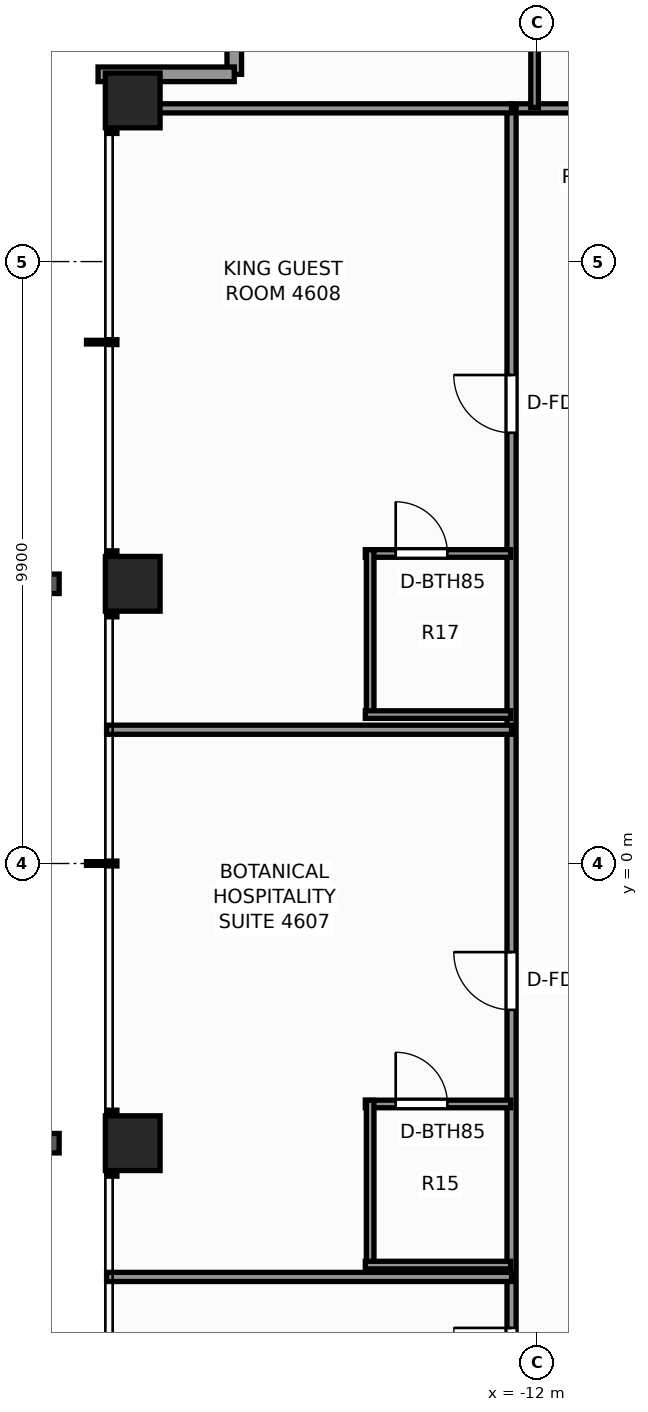
"""IFC4 building model, lengths in metres.
Left out: names, types, materials, properties, quantities, classifications, styles, units other than length and angle.
Written with IfcOpenShell. Run it as: python <this file> out.ifc"""

import sys

from ifc_helpers import new_model, si_unit, direction, frame, frame_2d, origin, origin_2d, place, context, subcontext, project, spatial, rectangle, extrude, element, fill, save


model = new_model("IFC4")
c1 = context("Model", 3, precision=1e-05, world=origin(), true_north=direction((0.0, 1.0)))
c2 = subcontext(c1, "Body", "Model", "MODEL_VIEW")
j1 = project(units=[si_unit("LENGTHUNIT", "METRE"), si_unit("PLANEANGLEUNIT", "RADIAN")], contexts=[c1])
p1 = place(None, origin())
s1 = spatial("IfcSite", under=j1, at=p1, CompositionType="ELEMENT")
p2 = place(p1, origin())
s2 = spatial("IfcBuilding", under=s1, at=p2, CompositionType="ELEMENT")
p3 = place(p2, frame((0.0, 0.0, 160.2)))
s3 = spatial("IfcBuildingStorey", under=s2, at=p3, CompositionType="ELEMENT", Elevation=160.2)
for number, where, z_axis, x_axis in (
    (1, (-18.65, -4.6, 0.0), (0.0, 0.0, 1.0), (1.0, 0.0, 0.0)),
    (2, (-18.65, 4.6, 0.0), (0.0, 0.0, 1.0), (1.0, 0.0, 0.0)),
    (3, (-18.65, 12.55, 0.0), (0.0, 0.0, 1.0), (1.0, 0.0, 0.0)),
):
    element("IfcColumn", number, at=place(p3, frame(where, z_axis=z_axis, x_axis=x_axis)), inside=s3, PredefinedType="COLUMN", context=c2, shape_type="SweptSolid", body=[
        extrude(rectangle(XDim=0.9, YDim=0.9, at=origin_2d()), origin(), (0.0, 0.0, 1.0), 3.3),
    ])
p4 = place(p3, frame((-16.98, 12.98, 0.0), z_axis=(0.0, 0.0, 1.0), x_axis=(0.0, 1.0, 0.0)))
e4 = element("IfcWall", 4, at=p4, inside=s3, PredefinedType="STANDARD", context=c2, shape_type="SweptSolid", body=[
    extrude(rectangle(XDim=2.24, YDim=0.24, at=frame_2d((1.12, 0.0))), origin(), (0.0, 0.0, 1.0), 2.483),
])
p5 = place(p4, frame((0.45, 0.0, 0.65)))
e5 = element("IfcOpeningElement", 5, at=p5, cuts=e4, PredefinedType="OPENING", context=c2, shape_type="SweptSolid", body=[
    extrude(rectangle(XDim=1.1, YDim=1.45, at=frame_2d((0.55, 0.725))), frame((0.0, 0.13, 0.0), z_axis=(0.0, -1.0, 0.0), x_axis=(1.0, 0.0, 0.0)), (0.0, 0.0, 1.0), 0.26),
])
p6 = place(p3, frame((-19.22, 12.98, 0.0), z_axis=(0.0, 0.0, 1.0), x_axis=(1.0, 0.0, 0.0)))
e6 = element("IfcWall", 6, at=p6, inside=s3, PredefinedType="STANDARD", context=c2, shape_type="SweptSolid", body=[
    extrude(rectangle(XDim=2.24, YDim=0.24, at=frame_2d((1.12, 0.0))), origin(), (0.0, 0.0, 1.0), 2.483),
])
p7 = place(p3, frame((-12.42, 12.42, 0.0), z_axis=(0.0, 0.0, 1.0), x_axis=(1.0, 0.0, 0.0)))
e7 = element("IfcWall", 7, at=p7, inside=s3, PredefinedType="PARTITIONING", context=c2, shape_type="SweptSolid", body=[
    extrude(rectangle(XDim=24.84, YDim=0.15, at=frame_2d((12.42, 0.0))), origin(), (0.0, 0.0, 1.0), 2.389),
])
p8 = place(p7, frame((3.831, 0.0, 0.0)))
e8 = element("IfcOpeningElement", 8, at=p8, cuts=e7, PredefinedType="OPENING", context=c2, shape_type="SweptSolid", body=[
    extrude(rectangle(XDim=0.95, YDim=2.06, at=frame_2d((0.475, 1.03))), frame((0.0, 0.085, 0.0), z_axis=(0.0, -1.0, 0.0), x_axis=(1.0, 0.0, 0.0)), (0.0, 0.0, 1.0), 0.17),
])
p9 = place(p7, frame((5.877, 0.0, 0.0)))
e9 = element("IfcOpeningElement", 9, at=p9, cuts=e7, PredefinedType="OPENING", context=c2, shape_type="SweptSolid", body=[
    extrude(rectangle(XDim=0.9, YDim=2.06, at=frame_2d((0.45, 1.03))), frame((0.0, 0.085, 0.0), z_axis=(0.0, -1.0, 0.0), x_axis=(1.0, 0.0, 0.0)), (0.0, 0.0, 1.0), 0.17),
])
p10 = place(p7, frame((13.146, 0.0, 0.0)))
e10 = element("IfcOpeningElement", 10, at=p10, cuts=e7, PredefinedType="OPENING", context=c2, shape_type="SweptSolid", body=[
    extrude(rectangle(XDim=0.95, YDim=2.06, at=frame_2d((0.475, 1.03))), frame((0.0, 0.085, 0.0), z_axis=(0.0, -1.0, 0.0), x_axis=(1.0, 0.0, 0.0)), (0.0, 0.0, 1.0), 0.17),
])
p11 = place(p7, frame((18.653, 0.0, 0.0)))
e11 = element("IfcOpeningElement", 11, at=p11, cuts=e7, PredefinedType="OPENING", context=c2, shape_type="SweptSolid", body=[
    extrude(rectangle(XDim=0.95, YDim=2.06, at=frame_2d((0.475, 1.03))), frame((0.0, 0.085, 0.0), z_axis=(0.0, -1.0, 0.0), x_axis=(1.0, 0.0, 0.0)), (0.0, 0.0, 1.0), 0.17),
])
p12 = place(p7, frame((20.916, 0.0, 0.0)))
e12 = element("IfcOpeningElement", 12, at=p12, cuts=e7, PredefinedType="OPENING", context=c2, shape_type="SweptSolid", body=[
    extrude(rectangle(XDim=0.9, YDim=2.06, at=frame_2d((0.45, 1.03))), frame((0.0, 0.085, 0.0), z_axis=(0.0, -1.0, 0.0), x_axis=(1.0, 0.0, 0.0)), (0.0, 0.0, 1.0), 0.17),
])
p13 = place(p3, frame((-12.42, -12.42, 0.0), z_axis=(0.0, 0.0, 1.0), x_axis=(0.0, 1.0, 0.0)))
e13 = element("IfcWall", 13, at=p13, inside=s3, PredefinedType="PARTITIONING", context=c2, shape_type="SweptSolid", body=[
    extrude(rectangle(XDim=24.84, YDim=0.15, at=frame_2d((12.42, 0.0))), origin(), (0.0, 0.0, 1.0), 2.389),
])
p14 = place(p13, frame((3.831, 0.0, 0.0)))
e14 = element("IfcOpeningElement", 14, at=p14, cuts=e13, PredefinedType="OPENING", context=c2, shape_type="SweptSolid", body=[
    extrude(rectangle(XDim=0.95, YDim=2.06, at=frame_2d((0.475, 1.03))), frame((0.0, 0.085, 0.0), z_axis=(0.0, -1.0, 0.0), x_axis=(1.0, 0.0, 0.0)), (0.0, 0.0, 1.0), 0.17),
])
p15 = place(p13, frame((10.012, 0.0, 0.0)))
e15 = element("IfcOpeningElement", 15, at=p15, cuts=e13, PredefinedType="OPENING", context=c2, shape_type="SweptSolid", body=[
    extrude(rectangle(XDim=0.95, YDim=2.06, at=frame_2d((0.475, 1.03))), frame((0.0, 0.085, 0.0), z_axis=(0.0, -1.0, 0.0), x_axis=(1.0, 0.0, 0.0)), (0.0, 0.0, 1.0), 0.17),
])
p16 = place(p13, frame((19.504, 0.0, 0.0)))
e16 = element("IfcOpeningElement", 16, at=p16, cuts=e13, PredefinedType="OPENING", context=c2, shape_type="SweptSolid", body=[
    extrude(rectangle(XDim=0.95, YDim=2.06, at=frame_2d((0.475, 1.03))), frame((0.0, 0.085, 0.0), z_axis=(0.0, -1.0, 0.0), x_axis=(1.0, 0.0, 0.0)), (0.0, 0.0, 1.0), 0.17),
])
p17 = place(p3, frame((-19.08, 12.42, 0.0), z_axis=(0.0, 0.0, 1.0), x_axis=(1.0, 0.0, 0.0)))
e17 = element("IfcWall", 17, at=p17, inside=s3, PredefinedType="PARTITIONING", context=c2, shape_type="SweptSolid", body=[
    extrude(rectangle(XDim=6.66, YDim=0.15, at=frame_2d((3.33, 0.0))), origin(), (0.0, 0.0, 1.0), 2.389),
])
for number, where, z_axis, x_axis in (
    (18, (-19.08, -6.8, 0.0), (0.0, 0.0, 1.0), (1.0, 0.0, 0.0)),
    (19, (-19.08, 2.2, 0.0), (0.0, 0.0, 1.0), (1.0, 0.0, 0.0)),
):
    element("IfcWall", number, at=place(p3, frame(where, z_axis=z_axis, x_axis=x_axis)), inside=s3, PredefinedType="PARTITIONING", context=c2, shape_type="SweptSolid", body=[
        extrude(rectangle(XDim=6.66, YDim=0.15, at=frame_2d((3.33, 0.0))), origin(), (0.0, 0.0, 1.0), 2.473),
    ])
p18 = place(p3, frame((-14.825, -3.955, 0.0), z_axis=(0.0, 0.0, 1.0), x_axis=(1.0, 0.0, 0.0)))
e20 = element("IfcWall", 20, at=p18, inside=s3, PredefinedType="PARTITIONING", context=c2, shape_type="SweptSolid", body=[
    extrude(rectangle(XDim=2.39, YDim=0.125, at=frame_2d((1.195, 0.0))), origin(), (0.0, 0.0, 1.0), 3.1),
])
p19 = place(p18, frame((0.5, 0.0, 0.0)))
e21 = element("IfcOpeningElement", 21, at=p19, cuts=e20, PredefinedType="OPENING", context=c2, shape_type="SweptSolid", body=[
    extrude(rectangle(XDim=0.85, YDim=2.03, at=frame_2d((0.425, 1.015))), frame((0.0, 0.073, 0.0), z_axis=(0.0, -1.0, 0.0), x_axis=(1.0, 0.0, 0.0)), (0.0, 0.0, 1.0), 0.145),
])
p20 = place(p3, frame((-14.745, -6.665, 0.0), z_axis=(0.0, 0.0, 1.0), x_axis=(0.0, 1.0, 0.0)))
e22 = element("IfcWall", 22, at=p20, inside=s3, PredefinedType="PARTITIONING", context=c2, shape_type="SweptSolid", body=[
    extrude(rectangle(XDim=2.77, YDim=0.125, at=frame_2d((1.385, 0.0))), origin(), (0.0, 0.0, 1.0), 2.389),
])
p21 = place(p3, frame((-14.825, -6.605, 0.0), z_axis=(0.0, 0.0, 1.0), x_axis=(1.0, 0.0, 0.0)))
e23 = element("IfcWall", 23, at=p21, inside=s3, PredefinedType="PARTITIONING", context=c2, shape_type="SweptSolid", body=[
    extrude(rectangle(XDim=2.39, YDim=0.125, at=frame_2d((1.195, 0.0))), origin(), (0.0, 0.0, 1.0), 3.1),
])
p22 = place(p3, frame((-14.825, 5.099, 0.0), z_axis=(0.0, 0.0, 1.0), x_axis=(1.0, 0.0, 0.0)))
e24 = element("IfcWall", 24, at=p22, inside=s3, PredefinedType="PARTITIONING", context=c2, shape_type="SweptSolid", body=[
    extrude(rectangle(XDim=2.39, YDim=0.125, at=frame_2d((1.195, 0.0))), origin(), (0.0, 0.0, 1.0), 3.1),
])
p23 = place(p22, frame((0.5, 0.0, 0.0)))
e25 = element("IfcOpeningElement", 25, at=p23, cuts=e24, PredefinedType="OPENING", context=c2, shape_type="SweptSolid", body=[
    extrude(rectangle(XDim=0.85, YDim=2.03, at=frame_2d((0.425, 1.015))), frame((0.0, 0.073, 0.0), z_axis=(0.0, -1.0, 0.0), x_axis=(1.0, 0.0, 0.0)), (0.0, 0.0, 1.0), 0.145),
])
p24 = place(p3, frame((-14.745, 2.389, 0.0), z_axis=(0.0, 0.0, 1.0), x_axis=(0.0, 1.0, 0.0)))
e26 = element("IfcWall", 26, at=p24, inside=s3, PredefinedType="PARTITIONING", context=c2, shape_type="SweptSolid", body=[
    extrude(rectangle(XDim=2.77, YDim=0.125, at=frame_2d((1.385, 0.0))), origin(), (0.0, 0.0, 1.0), 2.389),
])
for number, where, z_axis, x_axis in (
    (27, (-14.825, 2.449, 0.0), (0.0, 0.0, 1.0), (1.0, 0.0, 0.0)),
    (28, (-12.041, 12.435, 0.0), (0.0, 0.0, 1.0), (0.0, 1.0, 0.0)),
):
    element("IfcWall", number, at=place(p3, frame(where, z_axis=z_axis, x_axis=x_axis)), inside=s3, PredefinedType="PARTITIONING", context=c2, shape_type="SweptSolid", body=[
        extrude(rectangle(XDim=2.39, YDim=0.125, at=frame_2d((1.195, 0.0))), origin(), (0.0, 0.0, 1.0), 3.1),
    ])
p25 = place(p14, origin())
e29 = element("IfcDoor", 29, at=p25, inside=s3, OperationType="SINGLE_SWING_RIGHT", PredefinedType="DOOR", context=c2, shape_type="SweptSolid", body=[
    extrude(rectangle(XDim=0.95, YDim=2.06, at=frame_2d((0.475, 1.03))), frame((0.0, 0.025, 0.0), z_axis=(0.0, -1.0, 0.0), x_axis=(1.0, 0.0, 0.0)), (0.0, 0.0, 1.0), 0.05),
])
fill(e14, e29)
p26 = place(p19, origin())
e30 = element("IfcDoor", 30, at=p26, inside=s3, OperationType="SINGLE_SWING_LEFT", PredefinedType="DOOR", context=c2, shape_type="SweptSolid", body=[
    extrude(rectangle(XDim=0.85, YDim=2.03, at=frame_2d((0.425, 1.015))), frame((0.0, 0.025, 0.0), z_axis=(0.0, -1.0, 0.0), x_axis=(1.0, 0.0, 0.0)), (0.0, 0.0, 1.0), 0.05),
])
fill(e21, e30)
p27 = place(p15, origin())
e31 = element("IfcDoor", 31, at=p27, inside=s3, OperationType="SINGLE_SWING_RIGHT", PredefinedType="DOOR", context=c2, shape_type="SweptSolid", body=[
    extrude(rectangle(XDim=0.95, YDim=2.06, at=frame_2d((0.475, 1.03))), frame((0.0, 0.025, 0.0), z_axis=(0.0, -1.0, 0.0), x_axis=(1.0, 0.0, 0.0)), (0.0, 0.0, 1.0), 0.05),
])
fill(e15, e31)
p28 = place(p23, origin())
e32 = element("IfcDoor", 32, at=p28, inside=s3, OperationType="SINGLE_SWING_LEFT", PredefinedType="DOOR", context=c2, shape_type="SweptSolid", body=[
    extrude(rectangle(XDim=0.85, YDim=2.03, at=frame_2d((0.425, 1.015))), frame((0.0, 0.025, 0.0), z_axis=(0.0, -1.0, 0.0), x_axis=(1.0, 0.0, 0.0)), (0.0, 0.0, 1.0), 0.05),
])
fill(e25, e32)
p29 = place(p16, origin())
e33 = element("IfcDoor", 33, at=p29, inside=s3, OperationType="SINGLE_SWING_RIGHT", PredefinedType="DOOR", context=c2, shape_type="SweptSolid", body=[
    extrude(rectangle(XDim=0.95, YDim=2.06, at=frame_2d((0.475, 1.03))), frame((0.0, 0.025, 0.0), z_axis=(0.0, -1.0, 0.0), x_axis=(1.0, 0.0, 0.0)), (0.0, 0.0, 1.0), 0.05),
])
fill(e16, e33)
save(model, sys.argv[1])
